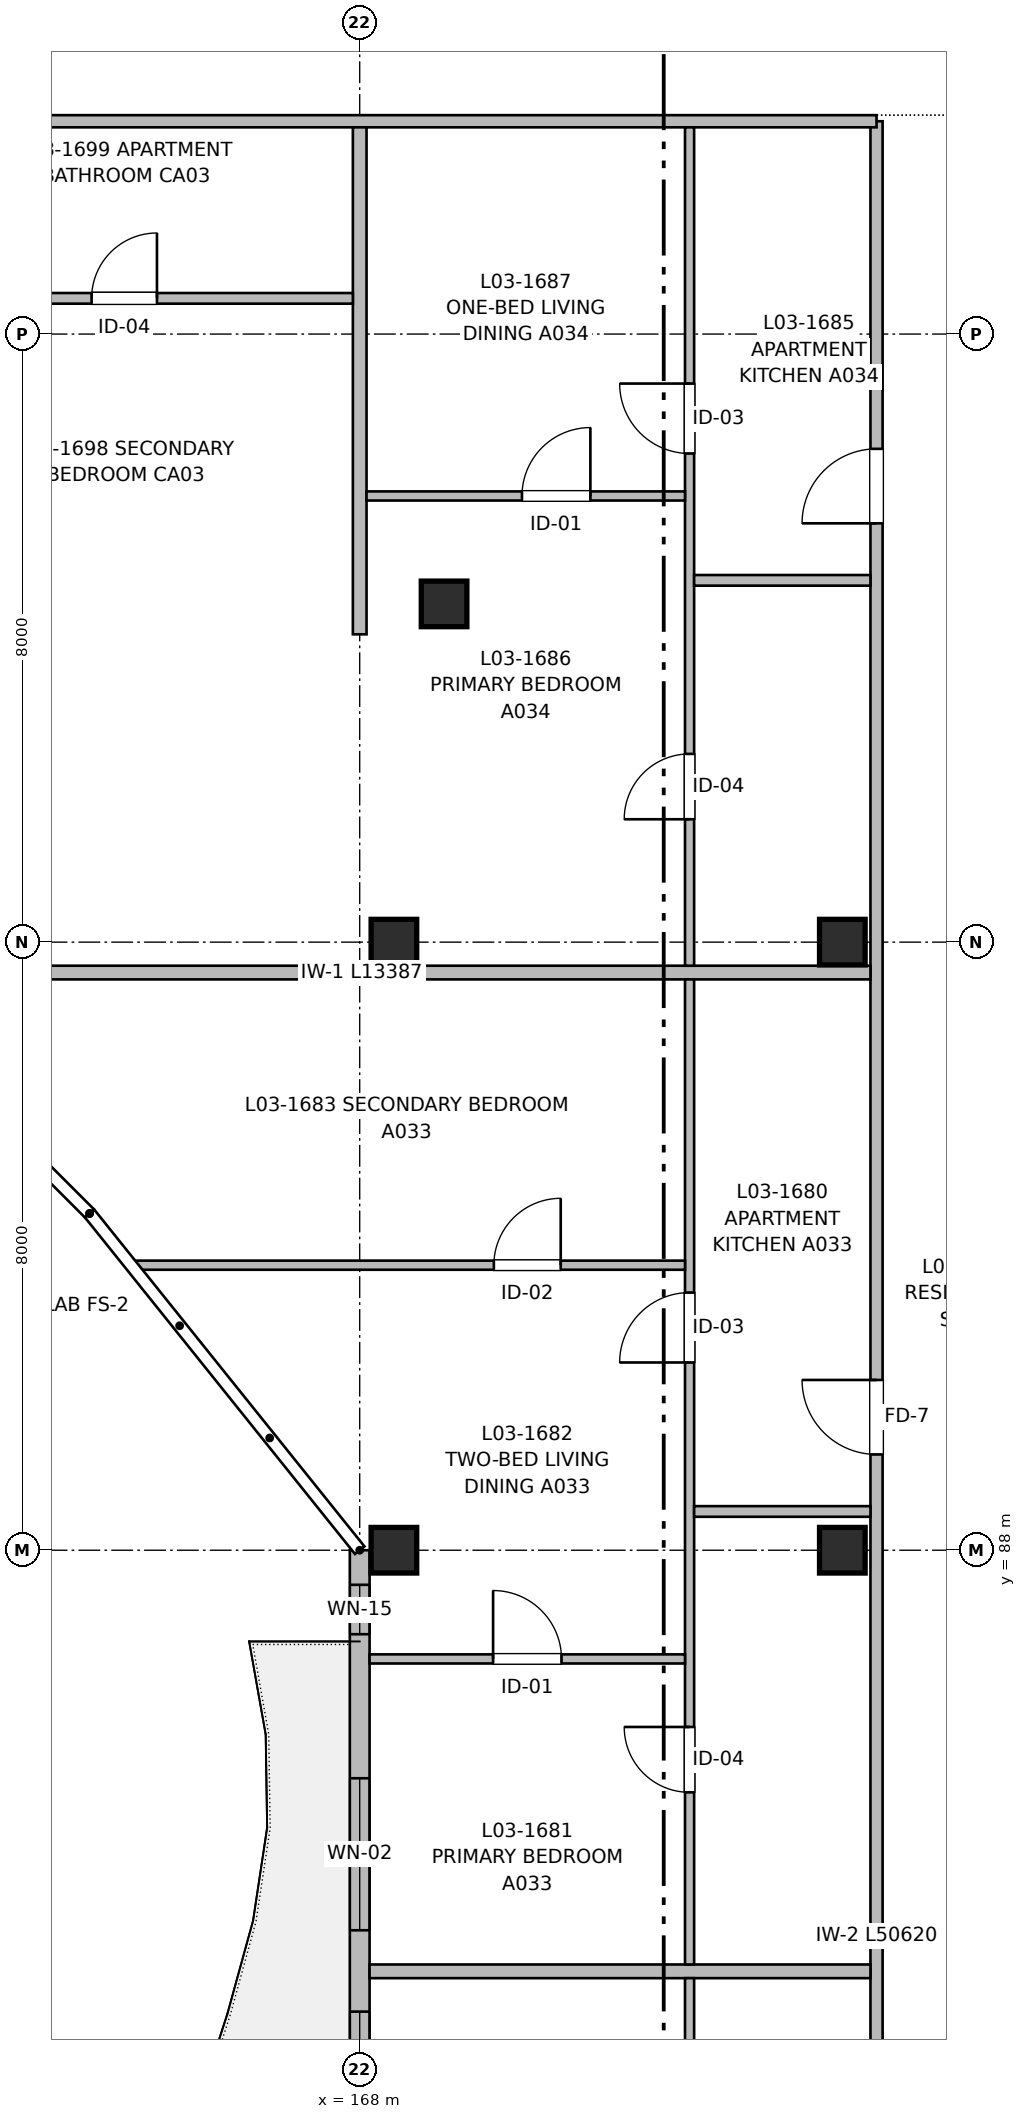
"""IFC4 building model, lengths in metres.
Left out: names, types, materials, properties, quantities, classifications, styles, units other than length and angle.
Written with IfcOpenShell. Run it as: python <this file> out.ifc"""

import sys

from ifc_helpers import new_model, si_unit, direction, frame, frame_2d, origin, origin_2d, place, context, subcontext, project, spatial, rectangle, extrude, element, fill, save


model = new_model("IFC4")
c1 = context("Model", 3, precision=1e-05, world=origin(), true_north=direction((0.0, 1.0)))
c2 = subcontext(c1, "Body", "Model", "MODEL_VIEW")
j1 = project(units=[si_unit("LENGTHUNIT", "METRE"), si_unit("PLANEANGLEUNIT", "RADIAN")], contexts=[c1])
p1 = place(None, origin())
s1 = spatial("IfcSite", under=j1, at=p1, CompositionType="ELEMENT")
p2 = place(p1, origin())
s2 = spatial("IfcBuilding", under=s1, at=p2, CompositionType="ELEMENT")
p3 = place(p2, frame((0.0, 0.0, 10.56)))
s3 = spatial("IfcBuildingStorey", under=s2, at=p3, CompositionType="ELEMENT", Elevation=10.56)
for number, where, z_axis, x_axis in (
    (1, (168.45, 88.0, 0.0), (0.0, 0.0, 1.0), (1.0, 0.0, 0.0)),
    (2, (168.45, 96.0, 0.0), (0.0, 0.0, 1.0), (1.0, 0.0, 0.0)),
    (3, (169.11, 100.45, 0.0), (0.0, 0.0, 1.0), (1.0, 0.0, 0.0)),
    (4, (174.35, 88.0, 0.0), (0.0, 0.0, 1.0), (1.0, 0.0, 0.0)),
    (5, (174.35, 96.0, 0.0), (0.0, 0.0, 1.0), (1.0, 0.0, 0.0)),
):
    element("IfcColumn", number, at=place(p3, frame(where, z_axis=z_axis, x_axis=x_axis)), inside=s3, PredefinedType="COLUMN", context=c2, shape_type="SweptSolid", body=[
        extrude(rectangle(XDim=0.6, YDim=0.6, at=origin_2d()), origin(), (0.0, 0.0, 1.0), 3.2),
    ])
p4 = place(p3, frame((168.0, 56.0, 0.0), z_axis=(0.0, 0.0, 1.0), x_axis=(0.0, 1.0, 0.0)))
e6 = element("IfcWall", 6, at=p4, inside=s3, PredefinedType="SOLIDWALL", context=c2, shape_type="SweptSolid", body=[
    extrude(rectangle(XDim=32.0, YDim=0.26, at=frame_2d((16.0, 0.0))), origin(), (0.0, 0.0, 1.0), 2.98),
])
p5 = place(p4, frame((3.4, 0.0, 0.0)))
e7 = element("IfcOpeningElement", 7, at=p5, cuts=e6, PredefinedType="OPENING", context=c2, shape_type="SweptSolid", body=[
    extrude(rectangle(XDim=1.2, YDim=2.2, at=frame_2d((0.6, 1.1))), frame((0.0, 0.14, 0.0), z_axis=(0.0, -1.0, 0.0), x_axis=(1.0, 0.0, 0.0)), (0.0, 0.0, 1.0), 0.28),
])
p6 = place(p4, frame((5.3, 0.0, 0.87)))
e8 = element("IfcOpeningElement", 8, at=p6, cuts=e6, PredefinedType="OPENING", context=c2, shape_type="SweptSolid", body=[
    extrude(rectangle(XDim=1.4, YDim=1.35, at=frame_2d((0.7, 0.675))), frame((0.0, 0.14, 0.0), z_axis=(0.0, -1.0, 0.0), x_axis=(1.0, 0.0, 0.0)), (0.0, 0.0, 1.0), 0.28),
])
p7 = place(p4, frame((10.31, 0.0, 0.72)))
e9 = element("IfcOpeningElement", 9, at=p7, cuts=e6, PredefinedType="OPENING", context=c2, shape_type="SweptSolid", body=[
    extrude(rectangle(XDim=1.68, YDim=1.5, at=frame_2d((0.84, 0.75))), frame((0.0, 0.14, 0.0), z_axis=(0.0, -1.0, 0.0), x_axis=(1.0, 0.0, 0.0)), (0.0, 0.0, 1.0), 0.28),
])
p8 = place(p4, frame((19.1, 0.0, 0.72)))
e10 = element("IfcOpeningElement", 10, at=p8, cuts=e6, PredefinedType="OPENING", context=c2, shape_type="SweptSolid", body=[
    extrude(rectangle(XDim=1.8, YDim=1.5, at=frame_2d((0.9, 0.75))), frame((0.0, 0.14, 0.0), z_axis=(0.0, -1.0, 0.0), x_axis=(1.0, 0.0, 0.0)), (0.0, 0.0, 1.0), 0.28),
])
p9 = place(p4, frame((27.0, 0.0, 0.72)))
e11 = element("IfcOpeningElement", 11, at=p9, cuts=e6, PredefinedType="OPENING", context=c2, shape_type="SweptSolid", body=[
    extrude(rectangle(XDim=2.0, YDim=1.5, at=frame_2d((1.0, 0.75))), frame((0.0, 0.14, 0.0), z_axis=(0.0, -1.0, 0.0), x_axis=(1.0, 0.0, 0.0)), (0.0, 0.0, 1.0), 0.28),
])
p10 = place(p4, frame((13.79, 0.0, 0.82)))
e12 = element("IfcOpeningElement", 12, at=p10, cuts=e6, PredefinedType="OPENING", context=c2, shape_type="SweptSolid", body=[
    extrude(rectangle(XDim=1.5, YDim=1.4, at=frame_2d((0.75, 0.7))), frame((0.0, 0.14, 0.0), z_axis=(0.0, -1.0, 0.0), x_axis=(1.0, 0.0, 0.0)), (0.0, 0.0, 1.0), 0.28),
])
p11 = place(p4, frame((24.43, 0.0, 0.82)))
e13 = element("IfcOpeningElement", 13, at=p11, cuts=e6, PredefinedType="OPENING", context=c2, shape_type="SweptSolid", body=[
    extrude(rectangle(XDim=1.5, YDim=1.4, at=frame_2d((0.75, 0.7))), frame((0.0, 0.14, 0.0), z_axis=(0.0, -1.0, 0.0), x_axis=(1.0, 0.0, 0.0)), (0.0, 0.0, 1.0), 0.28),
])
p12 = place(p4, frame((30.895, 0.0, 0.9)))
e14 = element("IfcOpeningElement", 14, at=p12, cuts=e6, PredefinedType="OPENING", context=c2, shape_type="SweptSolid", body=[
    extrude(rectangle(XDim=0.65, YDim=0.95, at=frame_2d((0.325, 0.475))), frame((0.0, 0.14, 0.0), z_axis=(0.0, -1.0, 0.0), x_axis=(1.0, 0.0, 0.0)), (0.0, 0.0, 1.0), 0.28),
])
p13 = place(p3, frame((174.8, 56.18, 0.0), z_axis=(0.0, 0.0, 1.0), x_axis=(0.0, 1.0, 0.0)))
e15 = element("IfcWall", 15, at=p13, inside=s3, PredefinedType="PARTITIONING", context=c2, shape_type="SweptSolid", body=[
    extrude(rectangle(XDim=50.62, YDim=0.16, at=frame_2d((25.31, 0.0))), origin(), (0.0, 0.0, 1.0), 2.935),
])
p14 = place(p13, frame((5.27, 0.0, 0.0)))
e16 = element("IfcOpeningElement", 16, at=p14, cuts=e15, PredefinedType="OPENING", context=c2, shape_type="SweptSolid", body=[
    extrude(rectangle(XDim=1.5, YDim=2.2, at=frame_2d((0.75, 1.1))), frame((0.0, 0.09, 0.0), z_axis=(0.0, -1.0, 0.0), x_axis=(1.0, 0.0, 0.0)), (0.0, 0.0, 1.0), 0.18),
])
p15 = place(p13, frame((19.4, 0.0, 0.0)))
e17 = element("IfcOpeningElement", 17, at=p15, cuts=e15, PredefinedType="OPENING", context=c2, shape_type="SweptSolid", body=[
    extrude(rectangle(XDim=1.02, YDim=2.15, at=frame_2d((0.51, 1.075))), frame((0.0, 0.09, 0.0), z_axis=(0.0, -1.0, 0.0), x_axis=(1.0, 0.0, 0.0)), (0.0, 0.0, 1.0), 0.18),
])
p16 = place(p13, frame((33.08, 0.0, 0.0)))
e18 = element("IfcOpeningElement", 18, at=p16, cuts=e15, PredefinedType="OPENING", context=c2, shape_type="SweptSolid", body=[
    extrude(rectangle(XDim=0.98, YDim=2.15, at=frame_2d((0.49, 1.075))), frame((0.0, 0.09, 0.0), z_axis=(0.0, -1.0, 0.0), x_axis=(1.0, 0.0, 0.0)), (0.0, 0.0, 1.0), 0.18),
])
p17 = place(p13, frame((45.33, 0.0, 0.0)))
e19 = element("IfcOpeningElement", 19, at=p17, cuts=e15, PredefinedType="OPENING", context=c2, shape_type="SweptSolid", body=[
    extrude(rectangle(XDim=0.98, YDim=2.15, at=frame_2d((0.49, 1.075))), frame((0.0, 0.09, 0.0), z_axis=(0.0, -1.0, 0.0), x_axis=(1.0, 0.0, 0.0)), (0.0, 0.0, 1.0), 0.18),
])
p18 = place(p3, frame((147.18, 106.8, 0.0), z_axis=(0.0, 0.0, 1.0), x_axis=(1.0, 0.0, 0.0)))
e20 = element("IfcWall", 20, at=p18, inside=s3, PredefinedType="PARTITIONING", context=c2, shape_type="SweptSolid", body=[
    extrude(rectangle(XDim=27.62, YDim=0.16, at=frame_2d((13.81, 0.0))), origin(), (0.0, 0.0, 1.0), 2.935),
])
p19 = place(p18, frame((3.495, 0.0, 0.0)))
e21 = element("IfcOpeningElement", 21, at=p19, cuts=e20, PredefinedType="OPENING", context=c2, shape_type="SweptSolid", body=[
    extrude(rectangle(XDim=1.05, YDim=2.15, at=frame_2d((0.525, 1.075))), frame((0.0, 0.09, 0.0), z_axis=(0.0, -1.0, 0.0), x_axis=(1.0, 0.0, 0.0)), (0.0, 0.0, 1.0), 0.18),
])
p20 = place(p18, frame((10.67, 0.0, 0.0)))
e22 = element("IfcOpeningElement", 22, at=p20, cuts=e20, PredefinedType="OPENING", context=c2, shape_type="SweptSolid", body=[
    extrude(rectangle(XDim=0.98, YDim=2.15, at=frame_2d((0.49, 1.075))), frame((0.0, 0.09, 0.0), z_axis=(0.0, -1.0, 0.0), x_axis=(1.0, 0.0, 0.0)), (0.0, 0.0, 1.0), 0.18),
])
p21 = place(p3, frame((168.0, 100.05, 0.0), z_axis=(0.0, 0.0, 1.0), x_axis=(0.0, 1.0, 0.0)))
e23 = element("IfcWall", 23, at=p21, inside=s3, PredefinedType="PARTITIONING", context=c2, shape_type="SweptSolid", body=[
    extrude(rectangle(XDim=6.67, YDim=0.18, at=frame_2d((3.335, 0.0))), origin(), (0.0, 0.0, 1.0), 2.935),
])
p22 = place(p3, frame((168.13, 82.46, 0.0), z_axis=(0.0, 0.0, 1.0), x_axis=(1.0, 0.0, 0.0)))
e24 = element("IfcWall", 24, at=p22, inside=s3, PredefinedType="PARTITIONING", context=c2, shape_type="SweptSolid", body=[
    extrude(rectangle(XDim=6.59, YDim=0.18, at=frame_2d((3.295, 0.0))), origin(), (0.0, 0.0, 1.0), 2.935),
])
p23 = place(p3, frame((161.333, 95.6, 0.0), z_axis=(0.0, 0.0, 1.0), x_axis=(1.0, 0.0, 0.0)))
e25 = element("IfcWall", 25, at=p23, inside=s3, PredefinedType="PARTITIONING", context=c2, shape_type="SweptSolid", body=[
    extrude(rectangle(XDim=13.387, YDim=0.18, at=frame_2d((6.694, 0.0))), origin(), (0.0, 0.0, 1.0), 2.935),
])
p24 = place(p3, frame((172.34, 68.4, 0.0), z_axis=(0.0, 0.0, 1.0), x_axis=(0.0, 1.0, 0.0)))
e26 = element("IfcWall", 26, at=p24, inside=s3, PredefinedType="PARTITIONING", context=c2, shape_type="SweptSolid", body=[
    extrude(rectangle(XDim=13.97, YDim=0.12, at=frame_2d((6.985, 0.0))), origin(), (0.0, 0.0, 1.0), 2.935),
])
p25 = place(p24, frame((2.443, 0.0, 0.0)))
e27 = element("IfcOpeningElement", 27, at=p25, cuts=e26, PredefinedType="OPENING", context=c2, shape_type="SweptSolid", body=[
    extrude(rectangle(XDim=0.94, YDim=2.1, at=frame_2d((0.47, 1.05))), frame((0.0, 0.07, 0.0), z_axis=(0.0, -1.0, 0.0), x_axis=(1.0, 0.0, 0.0)), (0.0, 0.0, 1.0), 0.14),
])
p26 = place(p24, frame((8.541, 0.0, 0.0)))
e28 = element("IfcOpeningElement", 28, at=p26, cuts=e26, PredefinedType="OPENING", context=c2, shape_type="SweptSolid", body=[
    extrude(rectangle(XDim=0.92, YDim=2.1, at=frame_2d((0.46, 1.05))), frame((0.0, 0.07, 0.0), z_axis=(0.0, -1.0, 0.0), x_axis=(1.0, 0.0, 0.0)), (0.0, 0.0, 1.0), 0.14),
])
p27 = place(p3, frame((172.34, 82.55, 0.0), z_axis=(0.0, 0.0, 1.0), x_axis=(0.0, 1.0, 0.0)))
e29 = element("IfcWall", 29, at=p27, inside=s3, PredefinedType="PARTITIONING", context=c2, shape_type="SweptSolid", body=[
    extrude(rectangle(XDim=12.96, YDim=0.12, at=frame_2d((6.48, 0.0))), origin(), (0.0, 0.0, 1.0), 2.935),
])
p28 = place(p27, frame((2.265, 0.0, 0.0)))
e30 = element("IfcOpeningElement", 30, at=p28, cuts=e29, PredefinedType="OPENING", context=c2, shape_type="SweptSolid", body=[
    extrude(rectangle(XDim=0.86, YDim=2.1, at=frame_2d((0.43, 1.05))), frame((0.0, 0.07, 0.0), z_axis=(0.0, -1.0, 0.0), x_axis=(1.0, 0.0, 0.0)), (0.0, 0.0, 1.0), 0.14),
])
p29 = place(p27, frame((7.92, 0.0, 0.0)))
e31 = element("IfcOpeningElement", 31, at=p29, cuts=e29, PredefinedType="OPENING", context=c2, shape_type="SweptSolid", body=[
    extrude(rectangle(XDim=0.92, YDim=2.1, at=frame_2d((0.46, 1.05))), frame((0.0, 0.07, 0.0), z_axis=(0.0, -1.0, 0.0), x_axis=(1.0, 0.0, 0.0)), (0.0, 0.0, 1.0), 0.14),
])
p30 = place(p3, frame((172.4, 88.51, 0.0), z_axis=(0.0, 0.0, 1.0), x_axis=(1.0, 0.0, 0.0)))
e32 = element("IfcWall", 32, at=p30, inside=s3, PredefinedType="PARTITIONING", context=c2, shape_type="SweptSolid", body=[
    extrude(rectangle(XDim=2.32, YDim=0.14, at=frame_2d((1.16, 0.0))), origin(), (0.0, 0.0, 1.0), 2.935),
])
p31 = place(p3, frame((168.13, 86.57, 0.0), z_axis=(0.0, 0.0, 1.0), x_axis=(1.0, 0.0, 0.0)))
e33 = element("IfcWall", 33, at=p31, inside=s3, PredefinedType="PARTITIONING", context=c2, shape_type="SweptSolid", body=[
    extrude(rectangle(XDim=4.15, YDim=0.12, at=frame_2d((2.075, 0.0))), origin(), (0.0, 0.0, 1.0), 2.935),
])
p32 = place(p31, frame((1.625, 0.0, 0.0)))
e34 = element("IfcOpeningElement", 34, at=p32, cuts=e33, PredefinedType="OPENING", context=c2, shape_type="SweptSolid", body=[
    extrude(rectangle(XDim=0.9, YDim=2.1, at=frame_2d((0.45, 1.05))), frame((0.0, 0.07, 0.0), z_axis=(0.0, -1.0, 0.0), x_axis=(1.0, 0.0, 0.0)), (0.0, 0.0, 1.0), 0.14),
])
p33 = place(p3, frame((165.043, 91.75, 0.0), z_axis=(0.0, 0.0, 1.0), x_axis=(1.0, 0.0, 0.0)))
e35 = element("IfcWall", 35, at=p33, inside=s3, PredefinedType="PARTITIONING", context=c2, shape_type="SweptSolid", body=[
    extrude(rectangle(XDim=7.237, YDim=0.12, at=frame_2d((3.619, 0.0))), origin(), (0.0, 0.0, 1.0), 2.935),
])
p34 = place(p33, frame((4.722, 0.0, 0.0)))
e36 = element("IfcOpeningElement", 36, at=p34, cuts=e35, PredefinedType="OPENING", context=c2, shape_type="SweptSolid", body=[
    extrude(rectangle(XDim=0.88, YDim=2.1, at=frame_2d((0.44, 1.05))), frame((0.0, 0.07, 0.0), z_axis=(0.0, -1.0, 0.0), x_axis=(1.0, 0.0, 0.0)), (0.0, 0.0, 1.0), 0.14),
])
p35 = place(p3, frame((172.34, 95.69, 0.0), z_axis=(0.0, 0.0, 1.0), x_axis=(0.0, 1.0, 0.0)))
e37 = element("IfcWall", 37, at=p35, inside=s3, PredefinedType="PARTITIONING", context=c2, shape_type="SweptSolid", body=[
    extrude(rectangle(XDim=11.03, YDim=0.12, at=frame_2d((5.515, 0.0))), origin(), (0.0, 0.0, 1.0), 2.935),
])
p36 = place(p35, frame((1.927, 0.0, 0.0)))
e38 = element("IfcOpeningElement", 38, at=p36, cuts=e37, PredefinedType="OPENING", context=c2, shape_type="SweptSolid", body=[
    extrude(rectangle(XDim=0.86, YDim=2.1, at=frame_2d((0.43, 1.05))), frame((0.0, 0.07, 0.0), z_axis=(0.0, -1.0, 0.0), x_axis=(1.0, 0.0, 0.0)), (0.0, 0.0, 1.0), 0.14),
])
p37 = place(p35, frame((6.739, 0.0, 0.0)))
e39 = element("IfcOpeningElement", 39, at=p37, cuts=e37, PredefinedType="OPENING", context=c2, shape_type="SweptSolid", body=[
    extrude(rectangle(XDim=0.92, YDim=2.1, at=frame_2d((0.46, 1.05))), frame((0.0, 0.07, 0.0), z_axis=(0.0, -1.0, 0.0), x_axis=(1.0, 0.0, 0.0)), (0.0, 0.0, 1.0), 0.14),
])
p38 = place(p3, frame((172.4, 100.76, 0.0), z_axis=(0.0, 0.0, 1.0), x_axis=(1.0, 0.0, 0.0)))
e40 = element("IfcWall", 40, at=p38, inside=s3, PredefinedType="PARTITIONING", context=c2, shape_type="SweptSolid", body=[
    extrude(rectangle(XDim=2.32, YDim=0.14, at=frame_2d((1.16, 0.0))), origin(), (0.0, 0.0, 1.0), 2.935),
])
p39 = place(p3, frame((168.09, 101.87, 0.0), z_axis=(0.0, 0.0, 1.0), x_axis=(1.0, 0.0, 0.0)))
e41 = element("IfcWall", 41, at=p39, inside=s3, PredefinedType="PARTITIONING", context=c2, shape_type="SweptSolid", body=[
    extrude(rectangle(XDim=4.19, YDim=0.12, at=frame_2d((2.095, 0.0))), origin(), (0.0, 0.0, 1.0), 2.935),
])
p40 = place(p39, frame((2.045, 0.0, 0.0)))
e42 = element("IfcOpeningElement", 42, at=p40, cuts=e41, PredefinedType="OPENING", context=c2, shape_type="SweptSolid", body=[
    extrude(rectangle(XDim=0.9, YDim=2.1, at=frame_2d((0.45, 1.05))), frame((0.0, 0.07, 0.0), z_axis=(0.0, -1.0, 0.0), x_axis=(1.0, 0.0, 0.0)), (0.0, 0.0, 1.0), 0.14),
])
p41 = place(p3, frame((161.94, 104.47, 0.0), z_axis=(0.0, 0.0, 1.0), x_axis=(1.0, 0.0, 0.0)))
e43 = element("IfcWall", 43, at=p41, inside=s3, PredefinedType="PARTITIONING", context=c2, shape_type="SweptSolid", body=[
    extrude(rectangle(XDim=5.97, YDim=0.14, at=frame_2d((2.985, 0.0))), origin(), (0.0, 0.0, 1.0), 2.935),
])
p42 = place(p41, frame((2.533, 0.0, 0.0)))
e44 = element("IfcOpeningElement", 44, at=p42, cuts=e43, PredefinedType="OPENING", context=c2, shape_type="SweptSolid", body=[
    extrude(rectangle(XDim=0.86, YDim=2.1, at=frame_2d((0.43, 1.05))), frame((0.0, 0.08, 0.0), z_axis=(0.0, -1.0, 0.0), x_axis=(1.0, 0.0, 0.0)), (0.0, 0.0, 1.0), 0.16),
])
p43 = place(p9, origin())
e45 = element("IfcWindow", 45, at=p43, inside=s3, PartitioningType="SINGLE_PANEL", PredefinedType="WINDOW", context=c2, shape_type="SweptSolid", body=[
    extrude(rectangle(XDim=2.0, YDim=1.5, at=frame_2d((1.0, 0.75))), frame((0.0, 0.03, 0.0), z_axis=(0.0, -1.0, 0.0), x_axis=(1.0, 0.0, 0.0)), (0.0, 0.0, 1.0), 0.06),
])
fill(e11, e45)
p44 = place(p28, origin())
e46 = element("IfcDoor", 46, at=p44, inside=s3, OperationType="SINGLE_SWING_RIGHT", PredefinedType="DOOR", context=c2, shape_type="SweptSolid", body=[
    extrude(rectangle(XDim=0.86, YDim=2.1, at=frame_2d((0.43, 1.05))), frame((0.0, 0.025, 0.0), z_axis=(0.0, -1.0, 0.0), x_axis=(1.0, 0.0, 0.0)), (0.0, 0.0, 1.0), 0.05),
])
fill(e30, e46)
p45 = place(p29, origin())
e47 = element("IfcDoor", 47, at=p45, inside=s3, OperationType="SINGLE_SWING_LEFT", PredefinedType="DOOR", context=c2, shape_type="SweptSolid", body=[
    extrude(rectangle(XDim=0.92, YDim=2.1, at=frame_2d((0.46, 1.05))), frame((0.0, 0.025, 0.0), z_axis=(0.0, -1.0, 0.0), x_axis=(1.0, 0.0, 0.0)), (0.0, 0.0, 1.0), 0.05),
])
fill(e31, e47)
p46 = place(p16, origin())
e48 = element("IfcDoor", 48, at=p46, inside=s3, OperationType="SINGLE_SWING_RIGHT", PredefinedType="DOOR", context=c2, shape_type="SweptSolid", body=[
    extrude(rectangle(XDim=0.98, YDim=2.15, at=frame_2d((0.49, 1.075))), frame((0.0, 0.025, 0.0), z_axis=(0.0, -1.0, 0.0), x_axis=(1.0, 0.0, 0.0)), (0.0, 0.0, 1.0), 0.05),
])
fill(e18, e48)
p47 = place(p32, origin())
e49 = element("IfcDoor", 49, at=p47, inside=s3, OperationType="SINGLE_SWING_LEFT", PredefinedType="DOOR", context=c2, shape_type="SweptSolid", body=[
    extrude(rectangle(XDim=0.9, YDim=2.1, at=frame_2d((0.45, 1.05))), frame((0.0, 0.025, 0.0), z_axis=(0.0, -1.0, 0.0), x_axis=(1.0, 0.0, 0.0)), (0.0, 0.0, 1.0), 0.05),
])
fill(e34, e49)
p48 = place(p34, origin())
e50 = element("IfcDoor", 50, at=p48, inside=s3, OperationType="SINGLE_SWING_RIGHT", PredefinedType="DOOR", context=c2, shape_type="SweptSolid", body=[
    extrude(rectangle(XDim=0.88, YDim=2.1, at=frame_2d((0.44, 1.05))), frame((0.0, 0.025, 0.0), z_axis=(0.0, -1.0, 0.0), x_axis=(1.0, 0.0, 0.0)), (0.0, 0.0, 1.0), 0.05),
])
fill(e36, e50)
p49 = place(p36, origin())
e51 = element("IfcDoor", 51, at=p49, inside=s3, OperationType="SINGLE_SWING_LEFT", PredefinedType="DOOR", context=c2, shape_type="SweptSolid", body=[
    extrude(rectangle(XDim=0.86, YDim=2.1, at=frame_2d((0.43, 1.05))), frame((0.0, 0.025, 0.0), z_axis=(0.0, -1.0, 0.0), x_axis=(1.0, 0.0, 0.0)), (0.0, 0.0, 1.0), 0.05),
])
fill(e38, e51)
p50 = place(p37, origin())
e52 = element("IfcDoor", 52, at=p50, inside=s3, OperationType="SINGLE_SWING_RIGHT", PredefinedType="DOOR", context=c2, shape_type="SweptSolid", body=[
    extrude(rectangle(XDim=0.92, YDim=2.1, at=frame_2d((0.46, 1.05))), frame((0.0, 0.025, 0.0), z_axis=(0.0, -1.0, 0.0), x_axis=(1.0, 0.0, 0.0)), (0.0, 0.0, 1.0), 0.05),
])
fill(e39, e52)
p51 = place(p17, origin())
e53 = element("IfcDoor", 53, at=p51, inside=s3, OperationType="SINGLE_SWING_LEFT", PredefinedType="DOOR", context=c2, shape_type="SweptSolid", body=[
    extrude(rectangle(XDim=0.98, YDim=2.15, at=frame_2d((0.49, 1.075))), frame((0.0, 0.025, 0.0), z_axis=(0.0, -1.0, 0.0), x_axis=(1.0, 0.0, 0.0)), (0.0, 0.0, 1.0), 0.05),
])
fill(e19, e53)
p52 = place(p40, origin())
e54 = element("IfcDoor", 54, at=p52, inside=s3, OperationType="SINGLE_SWING_RIGHT", PredefinedType="DOOR", context=c2, shape_type="SweptSolid", body=[
    extrude(rectangle(XDim=0.9, YDim=2.1, at=frame_2d((0.45, 1.05))), frame((0.0, 0.025, 0.0), z_axis=(0.0, -1.0, 0.0), x_axis=(1.0, 0.0, 0.0)), (0.0, 0.0, 1.0), 0.05),
])
fill(e42, e54)
p53 = place(p42, origin())
e55 = element("IfcDoor", 55, at=p53, inside=s3, OperationType="SINGLE_SWING_RIGHT", PredefinedType="DOOR", context=c2, shape_type="SweptSolid", body=[
    extrude(rectangle(XDim=0.86, YDim=2.1, at=frame_2d((0.43, 1.05))), frame((0.0, 0.025, 0.0), z_axis=(0.0, -1.0, 0.0), x_axis=(1.0, 0.0, 0.0)), (0.0, 0.0, 1.0), 0.05),
])
fill(e44, e55)
p54 = place(p11, origin())
e56 = element("IfcWindow", 56, at=p54, inside=s3, PartitioningType="SINGLE_PANEL", PredefinedType="WINDOW", context=c2, shape_type="SweptSolid", body=[
    extrude(rectangle(XDim=1.5, YDim=1.4, at=frame_2d((0.75, 0.7))), frame((0.0, 0.03, 0.0), z_axis=(0.0, -1.0, 0.0), x_axis=(1.0, 0.0, 0.0)), (0.0, 0.0, 1.0), 0.06),
])
fill(e13, e56)
p55 = place(p12, origin())
e57 = element("IfcWindow", 57, at=p55, inside=s3, PartitioningType="SINGLE_PANEL", PredefinedType="WINDOW", context=c2, shape_type="SweptSolid", body=[
    extrude(rectangle(XDim=0.65, YDim=0.95, at=frame_2d((0.325, 0.475))), frame((0.0, 0.03, 0.0), z_axis=(0.0, -1.0, 0.0), x_axis=(1.0, 0.0, 0.0)), (0.0, 0.0, 1.0), 0.06),
])
fill(e14, e57)
save(model, sys.argv[1])
